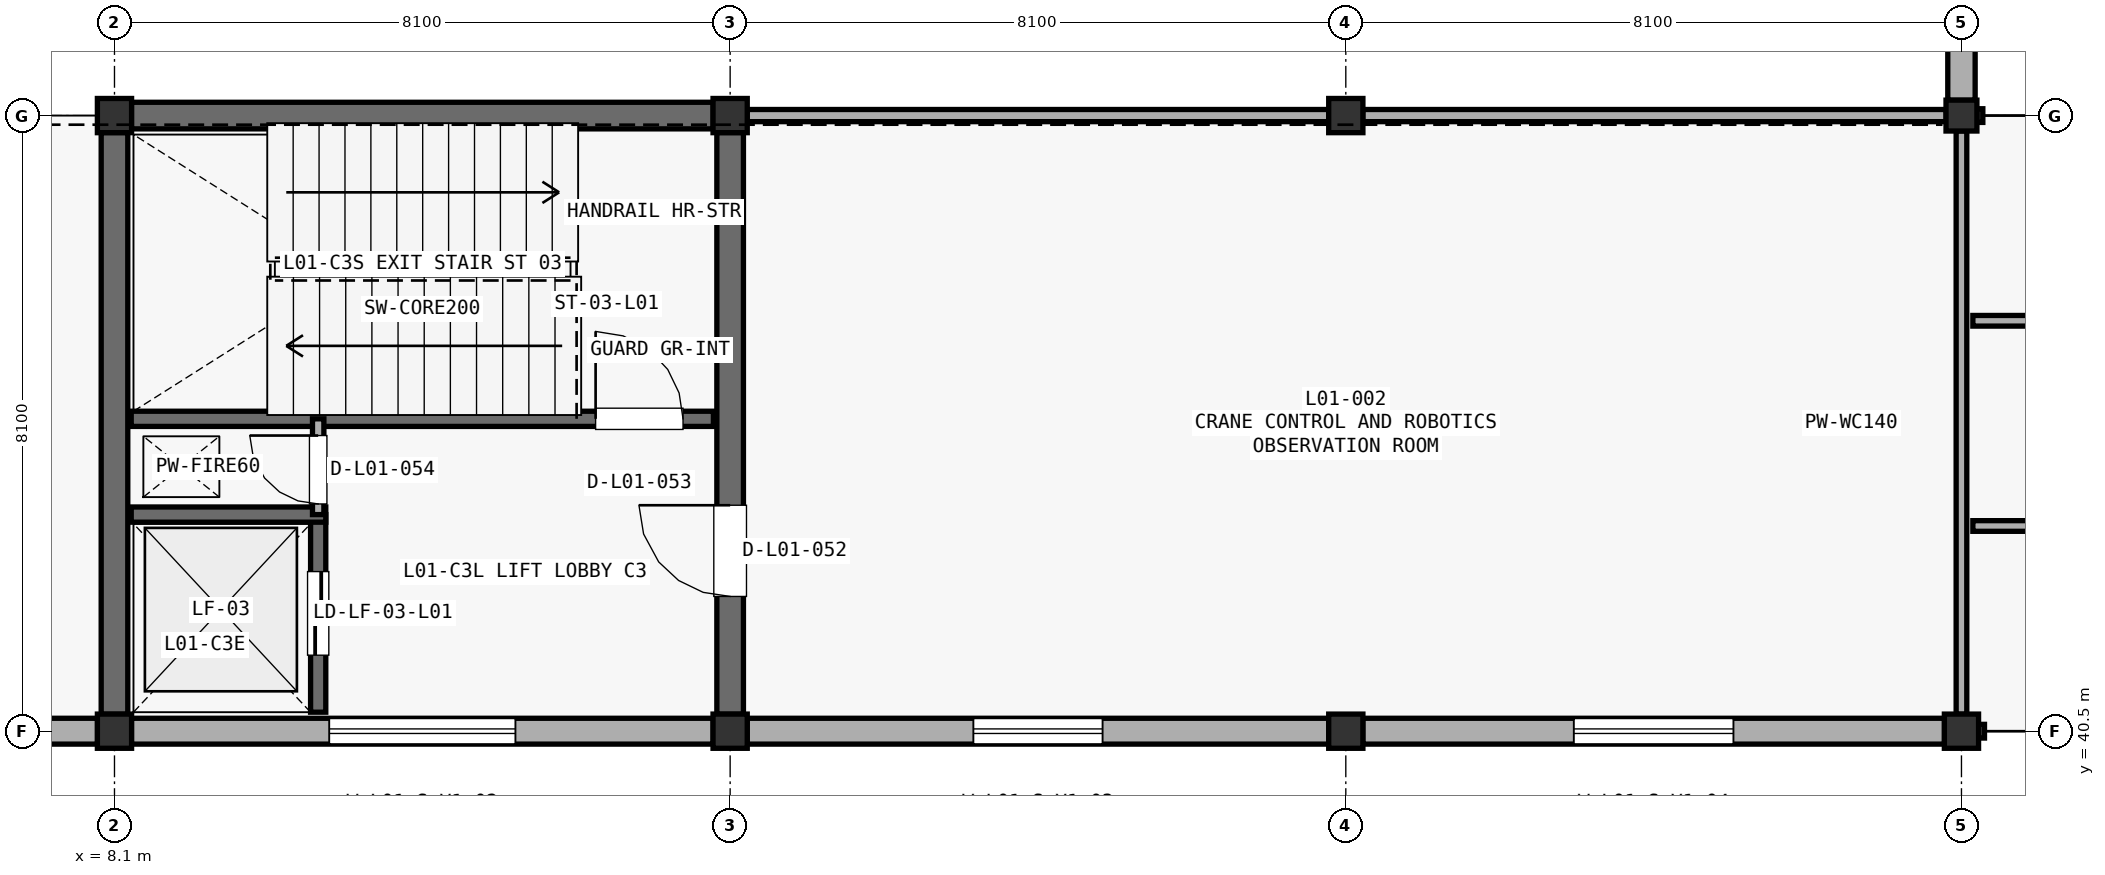
"""IFC4 building model, lengths in metres.
Left out: names, types, materials, properties, quantities, classifications, styles, units other than length and angle.
Written with IfcOpenShell. Run it as: python <this file> out.ifc"""

import sys

from ifc_helpers import new_model, si_unit, direction, frame, frame_2d, origin, origin_2d, place, context, subcontext, project, spatial, rectangle, hollow_circle, extrude, element, fill, save


model = new_model("IFC4")
c1 = context("Model", 3, precision=1e-05, world=origin(), true_north=direction((0.0, 1.0)))
c2 = subcontext(c1, "Body", "Model", "MODEL_VIEW")
j1 = project(units=[si_unit("LENGTHUNIT", "METRE"), si_unit("PLANEANGLEUNIT", "RADIAN")], contexts=[c1])
p1 = place(None, origin())
s1 = spatial("IfcSite", under=j1, at=p1, CompositionType="ELEMENT")
p2 = place(p1, origin())
s2 = spatial("IfcBuilding", under=s1, at=p2, CompositionType="ELEMENT")
p3 = place(p2, frame((0.0, 0.0, 5.1)))
s3 = spatial("IfcBuildingStorey", under=s2, at=p3, CompositionType="ELEMENT", Elevation=5.1)
for number, where, z_axis, x_axis in (
    (1, (8.1, 40.5, 0.0), (0.0, 0.0, 1.0), (1.0, 0.0, 0.0)),
    (2, (8.1, 48.6, 0.0), (0.0, 0.0, 1.0), (1.0, 0.0, 0.0)),
    (3, (16.2, 40.5, 0.0), (0.0, 0.0, 1.0), (1.0, 0.0, 0.0)),
    (4, (16.2, 48.6, 0.0), (0.0, 0.0, 1.0), (1.0, 0.0, 0.0)),
    (5, (24.3, 40.5, 0.0), (0.0, 0.0, 1.0), (1.0, 0.0, 0.0)),
    (6, (24.3, 48.6, 0.0), (0.0, 0.0, 1.0), (1.0, 0.0, 0.0)),
    (7, (32.4, 40.5, 0.0), (0.0, 0.0, 1.0), (1.0, 0.0, 0.0)),
):
    element("IfcColumn", number, at=place(p3, frame(where, z_axis=z_axis, x_axis=x_axis)), inside=s3, PredefinedType="COLUMN", context=c2, shape_type="SweptSolid", body=[
        extrude(rectangle(XDim=0.45, YDim=0.45, at=origin_2d()), origin(), (0.0, 0.0, 1.0), 4.59),
    ])
p4 = place(p3, frame((32.4, 48.6, 0.0), z_axis=(0.0, 0.0, 1.0), x_axis=(1.0, 0.0, 0.0)))
e8 = element("IfcColumn", 8, at=p4, inside=s3, PredefinedType="COLUMN", context=c2, shape_type="SweptSolid", body=[
    extrude(hollow_circle(Radius=0.203, WallThickness=0.016, at=origin_2d()), origin(), (0.0, 0.0, 1.0), 4.59),
])
p5 = place(p3, frame((0.298, 40.5, -0.38), z_axis=(0.0, 0.0, 1.0), x_axis=(1.0, 0.0, 0.0)))
e9 = element("IfcWall", 9, at=p5, inside=s3, PredefinedType="STANDARD", context=c2, shape_type="SweptSolid", body=[
    extrude(rectangle(XDim=7.579, YDim=0.34, at=frame_2d((3.79, 0.0))), origin(), (0.0, 0.0, 1.0), 4.375),
])
p6 = place(p5, frame((2.74, 0.0, 1.63)))
e10 = element("IfcOpeningElement", 10, at=p6, cuts=e9, PredefinedType="OPENING", context=c2, shape_type="SweptSolid", body=[
    extrude(rectangle(XDim=2.1, YDim=1.5, at=frame_2d((1.05, 0.75))), frame((0.0, 0.18, 0.0), z_axis=(0.0, -1.0, 0.0), x_axis=(1.0, 0.0, 0.0)), (0.0, 0.0, 1.0), 0.36),
])
p7 = place(p3, frame((8.323, 40.5, 0.0), z_axis=(0.0, 0.0, 1.0), x_axis=(1.0, 0.0, 0.0)))
e11 = element("IfcWall", 11, at=p7, inside=s3, PredefinedType="STANDARD", context=c2, shape_type="SweptSolid", body=[
    extrude(rectangle(XDim=7.654, YDim=0.34, at=frame_2d((3.827, 0.0))), origin(), (0.0, 0.0, 1.0), 3.887),
])
p8 = place(p7, frame((2.602, 0.0, 1.25)))
e12 = element("IfcOpeningElement", 12, at=p8, cuts=e11, PredefinedType="OPENING", context=c2, shape_type="SweptSolid", body=[
    extrude(rectangle(XDim=2.45, YDim=1.7, at=frame_2d((1.225, 0.85))), frame((0.0, 0.18, 0.0), z_axis=(0.0, -1.0, 0.0), x_axis=(1.0, 0.0, 0.0)), (0.0, 0.0, 1.0), 0.36),
])
p9 = place(p3, frame((16.423, 40.5, 0.0), z_axis=(0.0, 0.0, 1.0), x_axis=(1.0, 0.0, 0.0)))
e13 = element("IfcWall", 13, at=p9, inside=s3, PredefinedType="STANDARD", context=c2, shape_type="SweptSolid", body=[
    extrude(rectangle(XDim=7.654, YDim=0.34, at=frame_2d((3.827, 0.0))), origin(), (0.0, 0.0, 1.0), 3.946),
])
p10 = place(p9, frame((2.977, 0.0, 1.25)))
e14 = element("IfcOpeningElement", 14, at=p10, cuts=e13, PredefinedType="OPENING", context=c2, shape_type="SweptSolid", body=[
    extrude(rectangle(XDim=1.7, YDim=1.7, at=frame_2d((0.85, 0.85))), frame((0.0, 0.18, 0.0), z_axis=(0.0, -1.0, 0.0), x_axis=(1.0, 0.0, 0.0)), (0.0, 0.0, 1.0), 0.36),
])
p11 = place(p3, frame((24.523, 40.5, 0.0), z_axis=(0.0, 0.0, 1.0), x_axis=(1.0, 0.0, 0.0)))
e15 = element("IfcWall", 15, at=p11, inside=s3, PredefinedType="STANDARD", context=c2, shape_type="SweptSolid", body=[
    extrude(rectangle(XDim=7.654, YDim=0.34, at=frame_2d((3.827, 0.0))), origin(), (0.0, 0.0, 1.0), 3.753),
])
p12 = place(p11, frame((2.777, 0.0, 1.25)))
e16 = element("IfcOpeningElement", 16, at=p12, cuts=e15, PredefinedType="OPENING", context=c2, shape_type="SweptSolid", body=[
    extrude(rectangle(XDim=2.1, YDim=1.5, at=frame_2d((1.05, 0.75))), frame((0.0, 0.18, 0.0), z_axis=(0.0, -1.0, 0.0), x_axis=(1.0, 0.0, 0.0)), (0.0, 0.0, 1.0), 0.36),
])
p13 = place(p3, frame((32.4, 48.801, -0.38), z_axis=(0.0, 0.0, 1.0), x_axis=(0.0, 1.0, 0.0)))
e17 = element("IfcWall", 17, at=p13, inside=s3, PredefinedType="STANDARD", context=c2, shape_type="SweptSolid", body=[
    extrude(rectangle(XDim=7.676, YDim=0.36, at=frame_2d((3.838, 0.0))), origin(), (0.0, 0.0, 1.0), 4.229),
])
p14 = place(p13, frame((3.163, 0.0, 1.23)))
e18 = element("IfcOpeningElement", 18, at=p14, cuts=e17, PredefinedType="OPENING", context=c2, shape_type="SweptSolid", body=[
    extrude(rectangle(XDim=1.35, YDim=1.95, at=frame_2d((0.675, 0.975))), frame((0.0, 0.19, 0.0), z_axis=(0.0, -1.0, 0.0), x_axis=(1.0, 0.0, 0.0)), (0.0, 0.0, 1.0), 0.38),
])
for number, where, z_axis, x_axis in (
    (19, (8.323, 48.6, 0.0), (0.0, 0.0, 1.0), (1.0, 0.0, 0.0)),
    (20, (8.1, 40.723, 0.0), (0.0, 0.0, 1.0), (0.0, 1.0, 0.0)),
):
    element("IfcWall", number, at=place(p3, frame(where, z_axis=z_axis, x_axis=x_axis)), inside=s3, PredefinedType="SHEAR", context=c2, shape_type="SweptSolid", body=[
        extrude(rectangle(XDim=7.654, YDim=0.35, at=frame_2d((3.827, 0.0))), origin(), (0.0, 0.0, 1.0), 4.302),
    ])
p15 = place(p3, frame((16.2, 40.723, 0.0), z_axis=(0.0, 0.0, 1.0), x_axis=(0.0, 1.0, 0.0)))
e21 = element("IfcWall", 21, at=p15, inside=s3, PredefinedType="SHEAR", context=c2, shape_type="SweptSolid", body=[
    extrude(rectangle(XDim=7.654, YDim=0.35, at=frame_2d((3.827, 0.0))), origin(), (0.0, 0.0, 1.0), 4.302),
])
p16 = place(p15, frame((1.55, 0.0, 0.0)))
e22 = element("IfcOpeningElement", 22, at=p16, cuts=e21, PredefinedType="OPENING", context=c2, shape_type="SweptSolid", body=[
    extrude(rectangle(XDim=1.2, YDim=2.2, at=frame_2d((0.6, 1.1))), frame((0.0, 0.185, 0.0), z_axis=(0.0, -1.0, 0.0), x_axis=(1.0, 0.0, 0.0)), (0.0, 0.0, 1.0), 0.37),
])
p17 = place(p3, frame((8.32, 44.61, 0.0), z_axis=(0.0, 0.0, 1.0), x_axis=(1.0, 0.0, 0.0)))
e23 = element("IfcWall", 23, at=p17, inside=s3, PredefinedType="SHEAR", context=c2, shape_type="SweptSolid", body=[
    extrude(rectangle(XDim=7.66, YDim=0.2, at=frame_2d((3.83, 0.0))), origin(), (0.0, 0.0, 1.0), 4.302),
])
p18 = place(p17, frame((6.11, 0.0, 0.0)))
e24 = element("IfcOpeningElement", 24, at=p18, cuts=e23, PredefinedType="OPENING", context=c2, shape_type="SweptSolid", body=[
    extrude(rectangle(XDim=1.15, YDim=2.2, at=frame_2d((0.575, 1.1))), frame((0.0, 0.11, 0.0), z_axis=(0.0, -1.0, 0.0), x_axis=(1.0, 0.0, 0.0)), (0.0, 0.0, 1.0), 0.22),
])
p19 = place(p3, frame((10.78, 40.75, 0.0), z_axis=(0.0, 0.0, 1.0), x_axis=(0.0, 1.0, 0.0)))
e25 = element("IfcWall", 25, at=p19, inside=s3, PredefinedType="SHEAR", context=c2, shape_type="SweptSolid", body=[
    extrude(rectangle(XDim=2.6, YDim=0.2, at=frame_2d((1.3, 0.0))), origin(), (0.0, 0.0, 1.0), 4.302),
])
p20 = place(p19, frame((0.75, 0.0, 0.0)))
e26 = element("IfcOpeningElement", 26, at=p20, cuts=e25, PredefinedType="OPENING", context=c2, shape_type="SweptSolid", body=[
    extrude(rectangle(XDim=1.1, YDim=2.2, at=frame_2d((0.55, 1.1))), frame((0.0, 0.11, 0.0), z_axis=(0.0, -1.0, 0.0), x_axis=(1.0, 0.0, 0.0)), (0.0, 0.0, 1.0), 0.22),
])
p21 = place(p3, frame((8.32, 43.35, 0.0), z_axis=(0.0, 0.0, 1.0), x_axis=(1.0, 0.0, 0.0)))
e27 = element("IfcWall", 27, at=p21, inside=s3, PredefinedType="SHEAR", context=c2, shape_type="SweptSolid", body=[
    extrude(rectangle(XDim=2.56, YDim=0.2, at=frame_2d((1.28, 0.0))), origin(), (0.0, 0.0, 1.0), 4.302),
])
p22 = place(p3, frame((10.78, 43.35, 0.0), z_axis=(0.0, 0.0, 1.0), x_axis=(0.0, 1.0, 0.0)))
e28 = element("IfcWall", 28, at=p22, inside=s3, PredefinedType="PARTITIONING", context=c2, shape_type="SweptSolid", body=[
    extrude(rectangle(XDim=1.26, YDim=0.15, at=frame_2d((0.63, 0.0))), origin(), (0.0, 0.0, 1.0), 4.302),
])
p23 = place(p22, frame((0.14, 0.0, 0.0)))
e29 = element("IfcOpeningElement", 29, at=p23, cuts=e28, PredefinedType="OPENING", context=c2, shape_type="SweptSolid", body=[
    extrude(rectangle(XDim=0.9, YDim=2.15, at=frame_2d((0.45, 1.075))), frame((0.0, 0.085, 0.0), z_axis=(0.0, -1.0, 0.0), x_axis=(1.0, 0.0, 0.0)), (0.0, 0.0, 1.0), 0.17),
])
p24 = place(p3, frame((32.4, 40.723, 0.0), z_axis=(0.0, 0.0, 1.0), x_axis=(0.0, 1.0, 0.0)))
e30 = element("IfcWall", 30, at=p24, inside=s3, PredefinedType="PARTITIONING", context=c2, shape_type="SweptSolid", body=[
    extrude(rectangle(XDim=7.676, YDim=0.14, at=frame_2d((3.838, 0.0))), origin(), (0.0, 0.0, 1.0), 3.767),
])
for number, where, z_axis, x_axis in (
    (31, (32.55, 43.2, 0.0), (0.0, 0.0, 1.0), (1.0, 0.0, 0.0)),
    (32, (32.55, 45.9, 0.0), (0.0, 0.0, 1.0), (1.0, 0.0, 0.0)),
):
    element("IfcWall", number, at=place(p3, frame(where, z_axis=z_axis, x_axis=x_axis)), inside=s3, PredefinedType="PARTITIONING", context=c2, shape_type="SweptSolid", body=[
        extrude(rectangle(XDim=5.18, YDim=0.14, at=frame_2d((2.59, 0.0))), origin(), (0.0, 0.0, 1.0), 4.312),
    ])
p25 = place(p3, frame((16.423, 48.6, 0.0), z_axis=(0.0, 0.0, 1.0), x_axis=(1.0, 0.0, 0.0)))
e33 = element("IfcWall", 33, at=p25, inside=s3, PredefinedType="PARTITIONING", context=c2, shape_type="SweptSolid", body=[
    extrude(rectangle(XDim=7.654, YDim=0.16, at=frame_2d((3.827, 0.0))), origin(), (0.0, 0.0, 1.0), 3.753),
])
p26 = place(p3, frame((24.523, 48.6, 0.0), z_axis=(0.0, 0.0, 1.0), x_axis=(1.0, 0.0, 0.0)))
e34 = element("IfcWall", 34, at=p26, inside=s3, PredefinedType="PARTITIONING", context=c2, shape_type="SweptSolid", body=[
    extrude(rectangle(XDim=7.676, YDim=0.16, at=frame_2d((3.838, 0.0))), origin(), (0.0, 0.0, 1.0), 3.887),
])
p27 = place(p8, origin())
e35 = element("IfcWindow", 35, at=p27, inside=s3, PartitioningType="SINGLE_PANEL", PredefinedType="WINDOW", context=c2, shape_type="SweptSolid", body=[
    extrude(rectangle(XDim=2.45, YDim=1.7, at=frame_2d((1.225, 0.85))), frame((0.0, 0.03, 0.0), z_axis=(0.0, -1.0, 0.0), x_axis=(1.0, 0.0, 0.0)), (0.0, 0.0, 1.0), 0.06),
])
fill(e12, e35)
p28 = place(p10, origin())
e36 = element("IfcWindow", 36, at=p28, inside=s3, PartitioningType="SINGLE_PANEL", PredefinedType="WINDOW", context=c2, shape_type="SweptSolid", body=[
    extrude(rectangle(XDim=1.7, YDim=1.7, at=frame_2d((0.85, 0.85))), frame((0.0, 0.03, 0.0), z_axis=(0.0, -1.0, 0.0), x_axis=(1.0, 0.0, 0.0)), (0.0, 0.0, 1.0), 0.06),
])
fill(e14, e36)
p29 = place(p12, origin())
e37 = element("IfcWindow", 37, at=p29, inside=s3, PartitioningType="SINGLE_PANEL", PredefinedType="WINDOW", context=c2, shape_type="SweptSolid", body=[
    extrude(rectangle(XDim=2.1, YDim=1.5, at=frame_2d((1.05, 0.75))), frame((0.0, 0.03, 0.0), z_axis=(0.0, -1.0, 0.0), x_axis=(1.0, 0.0, 0.0)), (0.0, 0.0, 1.0), 0.06),
])
fill(e16, e37)
p30 = place(p16, origin())
e38 = element("IfcDoor", 38, at=p30, inside=s3, OperationType="SINGLE_SWING_RIGHT", PredefinedType="DOOR", context=c2, shape_type="SweptSolid", body=[
    extrude(rectangle(XDim=1.2, YDim=2.2, at=frame_2d((0.6, 1.1))), frame((0.0, 0.025, 0.0), z_axis=(0.0, -1.0, 0.0), x_axis=(1.0, 0.0, 0.0)), (0.0, 0.0, 1.0), 0.05),
])
fill(e22, e38)
p31 = place(p18, origin())
e39 = element("IfcDoor", 39, at=p31, inside=s3, OperationType="SINGLE_SWING_LEFT", PredefinedType="DOOR", context=c2, shape_type="SweptSolid", body=[
    extrude(rectangle(XDim=1.15, YDim=2.2, at=frame_2d((0.575, 1.1))), frame((0.0, 0.025, 0.0), z_axis=(0.0, -1.0, 0.0), x_axis=(1.0, 0.0, 0.0)), (0.0, 0.0, 1.0), 0.05),
])
fill(e24, e39)
p32 = place(p20, origin())
e40 = element("IfcDoor", 40, at=p32, inside=s3, OperationType="SLIDING_TO_LEFT", PredefinedType="DOOR", context=c2, shape_type="SweptSolid", body=[
    extrude(rectangle(XDim=1.1, YDim=2.2, at=frame_2d((0.55, 1.1))), frame((0.0, 0.025, 0.0), z_axis=(0.0, -1.0, 0.0), x_axis=(1.0, 0.0, 0.0)), (0.0, 0.0, 1.0), 0.05),
])
fill(e26, e40)
p33 = place(p23, origin())
e41 = element("IfcDoor", 41, at=p33, inside=s3, OperationType="SINGLE_SWING_RIGHT", PredefinedType="DOOR", context=c2, shape_type="SweptSolid", body=[
    extrude(rectangle(XDim=0.9, YDim=2.15, at=frame_2d((0.45, 1.075))), frame((0.0, 0.025, 0.0), z_axis=(0.0, -1.0, 0.0), x_axis=(1.0, 0.0, 0.0)), (0.0, 0.0, 1.0), 0.05),
])
fill(e29, e41)
save(model, sys.argv[1])
